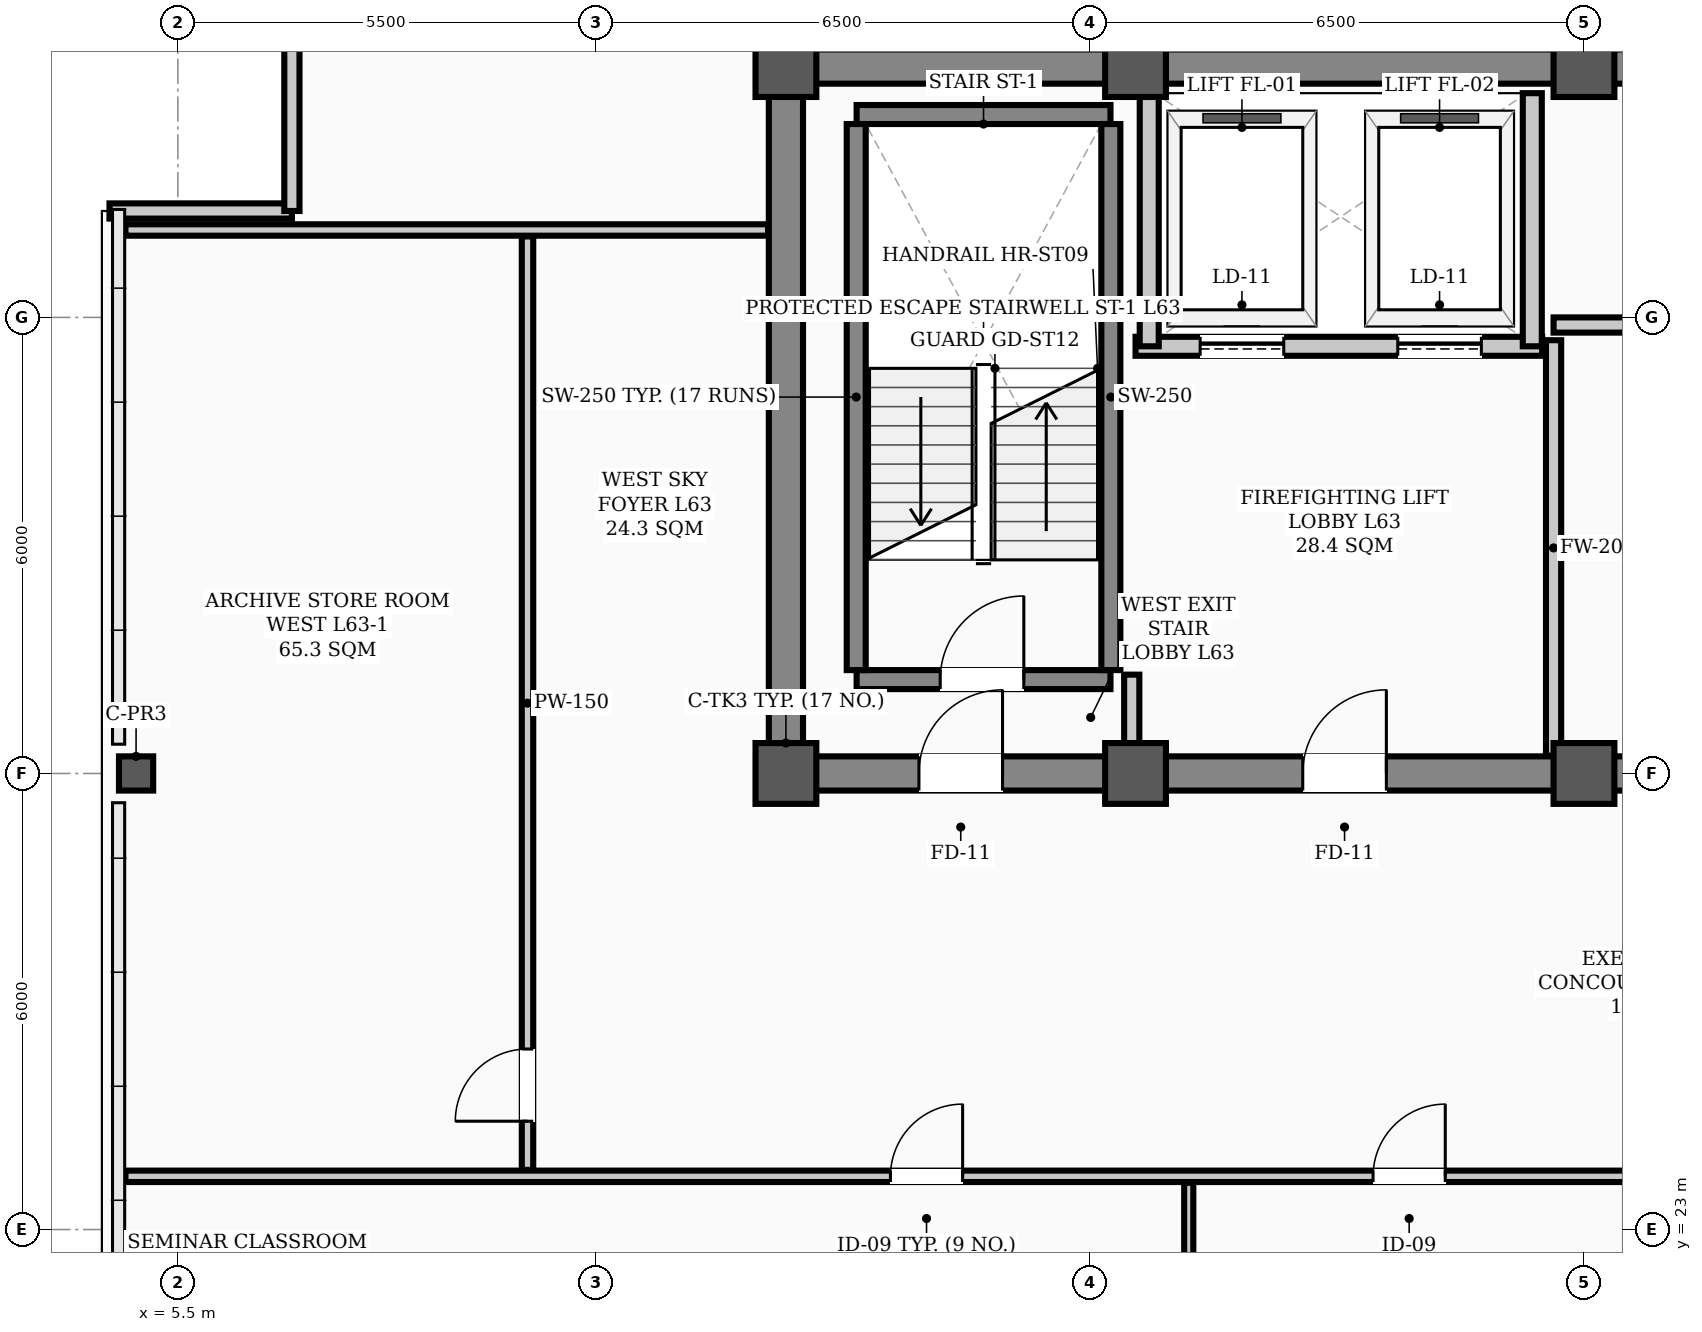
"""IFC4 building model, lengths in metres.
Left out: names, types, materials, properties, quantities, classifications, styles, units other than length and angle.
Written with IfcOpenShell. Run it as: python <this file> out.ifc"""

import sys

from ifc_helpers import new_model, si_unit, direction, frame, frame_2d, origin, origin_2d, place, context, subcontext, project, spatial, rectangle, hollow_rectangle, extrude, element, fill, save


model = new_model("IFC4")
c1 = context("Model", 3, precision=1e-05, world=origin(), true_north=direction((0.0, 1.0)))
c2 = subcontext(c1, "Body", "Model", "MODEL_VIEW")
j1 = project(units=[si_unit("LENGTHUNIT", "METRE"), si_unit("PLANEANGLEUNIT", "RADIAN")], contexts=[c1])
p1 = place(None, origin())
s1 = spatial("IfcSite", under=j1, at=p1, CompositionType="ELEMENT")
p2 = place(p1, origin())
s2 = spatial("IfcBuilding", under=s1, at=p2, CompositionType="ELEMENT")
p3 = place(p2, frame((0.0, 0.0, 254.0)))
s3 = spatial("IfcBuildingStorey", under=s2, at=p3, CompositionType="ELEMENT", Elevation=254.0)
for number, where, z_axis, x_axis in (
    (1, (13.5, 29.0, 0.0), (0.0, 0.0, 1.0), (1.0, 0.0, 0.0)),
    (2, (13.5, 38.3, 0.0), (0.0, 0.0, 1.0), (1.0, 0.0, 0.0)),
    (3, (18.1, 29.0, 0.0), (0.0, 0.0, 1.0), (1.0, 0.0, 0.0)),
    (4, (18.1, 38.3, 0.0), (0.0, 0.0, 1.0), (1.0, 0.0, 0.0)),
    (5, (24.0, 29.0, 0.0), (0.0, 0.0, 1.0), (1.0, 0.0, 0.0)),
    (6, (24.0, 38.3, 0.0), (0.0, 0.0, 1.0), (1.0, 0.0, 0.0)),
):
    element("IfcColumn", number, at=place(p3, frame(where, z_axis=z_axis, x_axis=x_axis)), inside=s3, PredefinedType="COLUMN", context=c2, shape_type="SweptSolid", body=[
        extrude(hollow_rectangle(XDim=0.8, YDim=0.8, WallThickness=0.032, InnerFilletRadius=0.016, OuterFilletRadius=0.048, at=origin_2d()), origin(), (0.0, 0.0, 1.0), 3.9),
    ])
p4 = place(p3, frame((4.95, 29.0, 0.0), z_axis=(0.0, 0.0, 1.0), x_axis=(1.0, 0.0, 0.0)))
e7 = element("IfcColumn", 7, at=p4, inside=s3, PredefinedType="COLUMN", context=c2, shape_type="SweptSolid", body=[
    extrude(hollow_rectangle(XDim=0.45, YDim=0.45, WallThickness=0.022, InnerFilletRadius=0.022, OuterFilletRadius=0.044, at=origin_2d()), origin(), (0.0, 0.0, 1.0), 3.9),
])
p5 = place(p3, frame((4.6, 36.4, 0.0), z_axis=(0.0, 0.0, 1.0), x_axis=(1.0, 0.0, 0.0)))
e8 = element("IfcWall", 8, at=p5, inside=s3, PredefinedType="PARAPET", context=c2, shape_type="SweptSolid", body=[
    extrude(rectangle(XDim=2.4, YDim=0.2, at=frame_2d((1.2, 0.0))), origin(), (0.0, 0.0, 1.0), 1.2),
])
p6 = place(p3, frame((7.0, 36.4, 0.0), z_axis=(0.0, 0.0, 1.0), x_axis=(0.0, 1.0, 0.0)))
e9 = element("IfcWall", 9, at=p6, inside=s3, PredefinedType="PARAPET", context=c2, shape_type="SweptSolid", body=[
    extrude(rectangle(XDim=2.4, YDim=0.2, at=frame_2d((1.2, 0.0))), origin(), (0.0, 0.0, 1.0), 1.2),
])
p7 = place(p3, frame((13.5, 29.0, 0.0), z_axis=(0.0, 0.0, 1.0), x_axis=(1.0, 0.0, 0.0)))
e10 = element("IfcWall", 10, at=p7, inside=s3, PredefinedType="SHEAR", context=c2, shape_type="SweptSolid", body=[
    extrude(rectangle(XDim=30.5, YDim=0.45, at=frame_2d((15.25, 0.0))), origin(), (0.0, 0.0, 1.0), 3.66),
])
p8 = place(p7, frame((1.75, 0.0, 0.0)))
e11 = element("IfcOpeningElement", 11, at=p8, cuts=e10, PredefinedType="OPENING", context=c2, shape_type="SweptSolid", body=[
    extrude(rectangle(XDim=1.1, YDim=2.08, at=frame_2d((0.55, 1.04))), frame((0.0, 0.235, 0.0), z_axis=(0.0, -1.0, 0.0), x_axis=(1.0, 0.0, 0.0)), (0.0, 0.0, 1.0), 0.47),
])
p9 = place(p7, frame((26.7, 0.0, 0.0)))
e12 = element("IfcOpeningElement", 12, at=p9, cuts=e10, PredefinedType="OPENING", context=c2, shape_type="SweptSolid", body=[
    extrude(rectangle(XDim=1.1, YDim=2.08, at=frame_2d((0.55, 1.04))), frame((0.0, 0.235, 0.0), z_axis=(0.0, -1.0, 0.0), x_axis=(1.0, 0.0, 0.0)), (0.0, 0.0, 1.0), 0.47),
])
p10 = place(p7, frame((6.8, 0.0, 0.0)))
e13 = element("IfcOpeningElement", 13, at=p10, cuts=e10, PredefinedType="OPENING", context=c2, shape_type="SweptSolid", body=[
    extrude(rectangle(XDim=1.1, YDim=2.08, at=frame_2d((0.55, 1.04))), frame((0.0, 0.235, 0.0), z_axis=(0.0, -1.0, 0.0), x_axis=(1.0, 0.0, 0.0)), (0.0, 0.0, 1.0), 0.47),
])
p11 = place(p7, frame((13.2, 0.0, 0.0)))
e14 = element("IfcOpeningElement", 14, at=p11, cuts=e10, PredefinedType="OPENING", context=c2, shape_type="SweptSolid", body=[
    extrude(rectangle(XDim=1.6, YDim=2.08, at=frame_2d((0.8, 1.04))), frame((0.0, 0.235, 0.0), z_axis=(0.0, -1.0, 0.0), x_axis=(1.0, 0.0, 0.0)), (0.0, 0.0, 1.0), 0.47),
])
p12 = place(p7, frame((19.6, 0.0, 0.0)))
e15 = element("IfcOpeningElement", 15, at=p12, cuts=e10, PredefinedType="OPENING", context=c2, shape_type="SweptSolid", body=[
    extrude(rectangle(XDim=0.9, YDim=2.08, at=frame_2d((0.45, 1.04))), frame((0.0, 0.235, 0.0), z_axis=(0.0, -1.0, 0.0), x_axis=(1.0, 0.0, 0.0)), (0.0, 0.0, 1.0), 0.47),
])
p13 = place(p7, frame((21.6, 0.0, 0.0)))
e16 = element("IfcOpeningElement", 16, at=p13, cuts=e10, PredefinedType="OPENING", context=c2, shape_type="SweptSolid", body=[
    extrude(rectangle(XDim=0.9, YDim=2.08, at=frame_2d((0.45, 1.04))), frame((0.0, 0.235, 0.0), z_axis=(0.0, -1.0, 0.0), x_axis=(1.0, 0.0, 0.0)), (0.0, 0.0, 1.0), 0.47),
])
p14 = place(p3, frame((13.5, 38.3, 0.0), z_axis=(0.0, 0.0, 1.0), x_axis=(1.0, 0.0, 0.0)))
e17 = element("IfcWall", 17, at=p14, inside=s3, PredefinedType="SHEAR", context=c2, shape_type="SweptSolid", body=[
    extrude(rectangle(XDim=30.5, YDim=0.45, at=frame_2d((15.25, 0.0))), origin(), (0.0, 0.0, 1.0), 3.66),
])
p15 = place(p3, frame((13.5, 29.35, 0.0), z_axis=(0.0, 0.0, 1.0), x_axis=(0.0, 1.0, 0.0)))
e18 = element("IfcWall", 18, at=p15, inside=s3, PredefinedType="SHEAR", context=c2, shape_type="SweptSolid", body=[
    extrude(rectangle(XDim=8.6, YDim=0.45, at=frame_2d((4.3, 0.0))), origin(), (0.0, 0.0, 1.0), 3.66),
])
p16 = place(p3, frame((14.43, 30.235, 0.0), z_axis=(0.0, 0.0, 1.0), x_axis=(1.0, 0.0, 0.0)))
e19 = element("IfcWall", 19, at=p16, inside=s3, PredefinedType="STANDARD", context=c2, shape_type="SweptSolid", body=[
    extrude(rectangle(XDim=3.34, YDim=0.25, at=frame_2d((1.67, 0.0))), origin(), (0.0, 0.0, 1.0), 3.66),
])
p17 = place(p16, frame((1.1, 0.0, 0.0)))
e20 = element("IfcOpeningElement", 20, at=p17, cuts=e19, PredefinedType="OPENING", context=c2, shape_type="SweptSolid", body=[
    extrude(rectangle(XDim=1.1, YDim=2.08, at=frame_2d((0.55, 1.04))), frame((0.0, 0.135, 0.0), z_axis=(0.0, -1.0, 0.0), x_axis=(1.0, 0.0, 0.0)), (0.0, 0.0, 1.0), 0.27),
])
p18 = place(p3, frame((14.43, 37.669, 0.0), z_axis=(0.0, 0.0, 1.0), x_axis=(1.0, 0.0, 0.0)))
e21 = element("IfcWall", 21, at=p18, inside=s3, PredefinedType="STANDARD", context=c2, shape_type="SweptSolid", body=[
    extrude(rectangle(XDim=3.34, YDim=0.25, at=frame_2d((1.67, 0.0))), origin(), (0.0, 0.0, 1.0), 3.66),
])
for number, where, z_axis, x_axis in (
    (22, (14.425, 30.36, 0.0), (0.0, 0.0, 1.0), (0.0, 1.0, 0.0)),
    (23, (17.775, 30.36, 0.0), (0.0, 0.0, 1.0), (0.0, 1.0, 0.0)),
):
    element("IfcWall", number, at=place(p3, frame(where, z_axis=z_axis, x_axis=x_axis)), inside=s3, PredefinedType="STANDARD", context=c2, shape_type="SweptSolid", body=[
        extrude(rectangle(XDim=7.184, YDim=0.25, at=frame_2d((3.592, 0.0))), origin(), (0.0, 0.0, 1.0), 3.66),
    ])
p19 = place(p3, frame((18.1, 34.62, 0.0), z_axis=(0.0, 0.0, 1.0), x_axis=(1.0, 0.0, 0.0)))
e24 = element("IfcWall", 24, at=p19, inside=s3, PredefinedType="STANDARD", context=c2, shape_type="SweptSolid", body=[
    extrude(rectangle(XDim=5.35, YDim=0.25, at=frame_2d((2.675, 0.0))), origin(), (0.0, 0.0, 1.0), 3.66),
])
p20 = place(p19, frame((0.85, 0.0, 0.0)))
e25 = element("IfcOpeningElement", 25, at=p20, cuts=e24, PredefinedType="OPENING", context=c2, shape_type="SweptSolid", body=[
    extrude(rectangle(XDim=1.1, YDim=2.08, at=frame_2d((0.55, 1.04))), frame((0.0, 0.135, 0.0), z_axis=(0.0, -1.0, 0.0), x_axis=(1.0, 0.0, 0.0)), (0.0, 0.0, 1.0), 0.27),
])
p21 = place(p19, frame((3.45, 0.0, 0.0)))
e26 = element("IfcOpeningElement", 26, at=p21, cuts=e24, PredefinedType="OPENING", context=c2, shape_type="SweptSolid", body=[
    extrude(rectangle(XDim=1.1, YDim=2.08, at=frame_2d((0.55, 1.04))), frame((0.0, 0.135, 0.0), z_axis=(0.0, -1.0, 0.0), x_axis=(1.0, 0.0, 0.0)), (0.0, 0.0, 1.0), 0.27),
])
for number, where, z_axis, x_axis in (
    (27, (18.28, 34.62, 0.0), (0.0, 0.0, 1.0), (0.0, 1.0, 0.0)),
    (28, (23.32, 34.62, 0.0), (0.0, 0.0, 1.0), (0.0, 1.0, 0.0)),
):
    element("IfcWall", number, at=place(p3, frame(where, z_axis=z_axis, x_axis=x_axis)), inside=s3, PredefinedType="STANDARD", context=c2, shape_type="SweptSolid", body=[
        extrude(rectangle(XDim=3.33, YDim=0.25, at=frame_2d((1.665, 0.0))), origin(), (0.0, 0.0, 1.0), 2.24),
    ])
p22 = place(p3, frame((23.6, 34.9, 0.0), z_axis=(0.0, 0.0, 1.0), x_axis=(1.0, 0.0, 0.0)))
e29 = element("IfcWall", 29, at=p22, inside=s3, PredefinedType="STANDARD", context=c2, shape_type="SweptSolid", body=[
    extrude(rectangle(XDim=8.18, YDim=0.2, at=frame_2d((4.09, 0.0))), origin(), (0.0, 0.0, 1.0), 3.66),
])
p23 = place(p22, frame((3.45, 0.0, 0.0)))
e30 = element("IfcOpeningElement", 30, at=p23, cuts=e29, PredefinedType="OPENING", context=c2, shape_type="SweptSolid", body=[
    extrude(rectangle(XDim=1.1, YDim=2.08, at=frame_2d((0.55, 1.04))), frame((0.0, 0.11, 0.0), z_axis=(0.0, -1.0, 0.0), x_axis=(1.0, 0.0, 0.0)), (0.0, 0.0, 1.0), 0.22),
])
p24 = place(p3, frame((4.81, 23.7, 0.0), z_axis=(0.0, 0.0, 1.0), x_axis=(1.0, 0.0, 0.0)))
e31 = element("IfcWall", 31, at=p24, inside=s3, PredefinedType="PARTITIONING", context=c2, shape_type="SweptSolid", body=[
    extrude(rectangle(XDim=40.88, YDim=0.15, at=frame_2d((20.44, 0.0))), origin(), (0.0, 0.0, 1.0), 2.24),
])
p25 = place(p24, frame((10.065, 0.0, 0.0)))
e32 = element("IfcOpeningElement", 32, at=p25, cuts=e31, PredefinedType="OPENING", context=c2, shape_type="SweptSolid", body=[
    extrude(rectangle(XDim=0.95, YDim=2.08, at=frame_2d((0.475, 1.04))), frame((0.0, 0.085, 0.0), z_axis=(0.0, -1.0, 0.0), x_axis=(1.0, 0.0, 0.0)), (0.0, 0.0, 1.0), 0.17),
])
p26 = place(p24, frame((16.415, 0.0, 0.0)))
e33 = element("IfcOpeningElement", 33, at=p26, cuts=e31, PredefinedType="OPENING", context=c2, shape_type="SweptSolid", body=[
    extrude(rectangle(XDim=0.95, YDim=2.08, at=frame_2d((0.475, 1.04))), frame((0.0, 0.085, 0.0), z_axis=(0.0, -1.0, 0.0), x_axis=(1.0, 0.0, 0.0)), (0.0, 0.0, 1.0), 0.17),
])
p27 = place(p24, frame((23.815, 0.0, 0.0)))
e34 = element("IfcOpeningElement", 34, at=p27, cuts=e31, PredefinedType="OPENING", context=c2, shape_type="SweptSolid", body=[
    extrude(rectangle(XDim=0.95, YDim=2.08, at=frame_2d((0.475, 1.04))), frame((0.0, 0.085, 0.0), z_axis=(0.0, -1.0, 0.0), x_axis=(1.0, 0.0, 0.0)), (0.0, 0.0, 1.0), 0.17),
])
p28 = place(p24, frame((35.26, 0.0, 0.0)))
e35 = element("IfcOpeningElement", 35, at=p28, cuts=e31, PredefinedType="OPENING", context=c2, shape_type="SweptSolid", body=[
    extrude(rectangle(XDim=0.95, YDim=2.08, at=frame_2d((0.475, 1.04))), frame((0.0, 0.085, 0.0), z_axis=(0.0, -1.0, 0.0), x_axis=(1.0, 0.0, 0.0)), (0.0, 0.0, 1.0), 0.17),
])
p29 = place(p3, frame((4.81, 36.15, 0.0), z_axis=(0.0, 0.0, 1.0), x_axis=(1.0, 0.0, 0.0)))
e36 = element("IfcWall", 36, at=p29, inside=s3, PredefinedType="PARTITIONING", context=c2, shape_type="SweptSolid", body=[
    extrude(rectangle(XDim=8.455, YDim=0.15, at=frame_2d((4.228, 0.0))), origin(), (0.0, 0.0, 1.0), 2.24),
])
p30 = place(p3, frame((18.05, 29.235, 0.0), z_axis=(0.0, 0.0, 1.0), x_axis=(0.0, 1.0, 0.0)))
e37 = element("IfcWall", 37, at=p30, inside=s3, PredefinedType="STANDARD", context=c2, shape_type="SweptSolid", body=[
    extrude(rectangle(XDim=1.065, YDim=0.2, at=frame_2d((0.532, 0.0))), origin(), (0.0, 0.0, 1.0), 2.24),
])
p31 = place(p3, frame((23.6, 29.235, 0.0), z_axis=(0.0, 0.0, 1.0), x_axis=(0.0, 1.0, 0.0)))
e38 = element("IfcWall", 38, at=p31, inside=s3, PredefinedType="STANDARD", context=c2, shape_type="SweptSolid", body=[
    extrude(rectangle(XDim=5.465, YDim=0.2, at=frame_2d((2.732, 0.0))), origin(), (0.0, 0.0, 1.0), 2.24),
])
p32 = place(p3, frame((10.1, 23.785, 0.0), z_axis=(0.0, 0.0, 1.0), x_axis=(0.0, 1.0, 0.0)))
e39 = element("IfcWall", 39, at=p32, inside=s3, PredefinedType="PARTITIONING", context=c2, shape_type="SweptSolid", body=[
    extrude(rectangle(XDim=12.28, YDim=0.15, at=frame_2d((6.14, 0.0))), origin(), (0.0, 0.0, 1.0), 2.24),
])
p33 = place(p32, frame((0.64, 0.0, 0.0)))
e40 = element("IfcOpeningElement", 40, at=p33, cuts=e39, PredefinedType="OPENING", context=c2, shape_type="SweptSolid", body=[
    extrude(rectangle(XDim=0.95, YDim=2.08, at=frame_2d((0.475, 1.04))), frame((0.0, 0.085, 0.0), z_axis=(0.0, -1.0, 0.0), x_axis=(1.0, 0.0, 0.0)), (0.0, 0.0, 1.0), 0.17),
])
p34 = place(p3, frame((18.8, 12.41, 0.0), z_axis=(0.0, 0.0, 1.0), x_axis=(0.0, 1.0, 0.0)))
e41 = element("IfcWall", 41, at=p34, inside=s3, PredefinedType="PARTITIONING", context=c2, shape_type="SweptSolid", body=[
    extrude(rectangle(XDim=11.205, YDim=0.12, at=frame_2d((5.603, 0.0))), origin(), (0.0, 0.0, 1.0), 2.24),
])
p35 = place(p17, origin())
e42 = element("IfcDoor", 42, at=p35, inside=s3, OperationType="SINGLE_SWING_RIGHT", PredefinedType="DOOR", context=c2, shape_type="SweptSolid", body=[
    extrude(rectangle(XDim=1.1, YDim=2.08, at=frame_2d((0.55, 1.04))), frame((0.0, 0.025, 0.0), z_axis=(0.0, -1.0, 0.0), x_axis=(1.0, 0.0, 0.0)), (0.0, 0.0, 1.0), 0.05),
])
fill(e20, e42)
p36 = place(p8, origin())
e43 = element("IfcDoor", 43, at=p36, inside=s3, OperationType="SINGLE_SWING_RIGHT", PredefinedType="DOOR", context=c2, shape_type="SweptSolid", body=[
    extrude(rectangle(XDim=1.1, YDim=2.08, at=frame_2d((0.55, 1.04))), frame((0.0, 0.025, 0.0), z_axis=(0.0, -1.0, 0.0), x_axis=(1.0, 0.0, 0.0)), (0.0, 0.0, 1.0), 0.05),
])
fill(e11, e43)
p37 = place(p10, origin())
e44 = element("IfcDoor", 44, at=p37, inside=s3, OperationType="SINGLE_SWING_RIGHT", PredefinedType="DOOR", context=c2, shape_type="SweptSolid", body=[
    extrude(rectangle(XDim=1.1, YDim=2.08, at=frame_2d((0.55, 1.04))), frame((0.0, 0.025, 0.0), z_axis=(0.0, -1.0, 0.0), x_axis=(1.0, 0.0, 0.0)), (0.0, 0.0, 1.0), 0.05),
])
fill(e13, e44)
p38 = place(p25, origin())
e45 = element("IfcDoor", 45, at=p38, inside=s3, OperationType="SINGLE_SWING_RIGHT", PredefinedType="DOOR", context=c2, shape_type="SweptSolid", body=[
    extrude(rectangle(XDim=0.95, YDim=2.08, at=frame_2d((0.475, 1.04))), frame((0.0, 0.025, 0.0), z_axis=(0.0, -1.0, 0.0), x_axis=(1.0, 0.0, 0.0)), (0.0, 0.0, 1.0), 0.05),
])
fill(e32, e45)
p39 = place(p26, origin())
e46 = element("IfcDoor", 46, at=p39, inside=s3, OperationType="SINGLE_SWING_RIGHT", PredefinedType="DOOR", context=c2, shape_type="SweptSolid", body=[
    extrude(rectangle(XDim=0.95, YDim=2.08, at=frame_2d((0.475, 1.04))), frame((0.0, 0.025, 0.0), z_axis=(0.0, -1.0, 0.0), x_axis=(1.0, 0.0, 0.0)), (0.0, 0.0, 1.0), 0.05),
])
fill(e33, e46)
p40 = place(p33, origin())
e47 = element("IfcDoor", 47, at=p40, inside=s3, OperationType="SINGLE_SWING_LEFT", PredefinedType="DOOR", context=c2, shape_type="SweptSolid", body=[
    extrude(rectangle(XDim=0.95, YDim=2.08, at=frame_2d((0.475, 1.04))), frame((0.0, 0.025, 0.0), z_axis=(0.0, -1.0, 0.0), x_axis=(1.0, 0.0, 0.0)), (0.0, 0.0, 1.0), 0.05),
])
fill(e40, e47)
p41 = place(p20, origin())
e48 = element("IfcDoor", 48, at=p41, inside=s3, OperationType="SLIDING_TO_LEFT", PredefinedType="DOOR", context=c2, shape_type="SweptSolid", body=[
    extrude(rectangle(XDim=1.1, YDim=2.08, at=frame_2d((0.55, 1.04))), frame((0.0, 0.025, 0.0), z_axis=(0.0, -1.0, 0.0), x_axis=(1.0, 0.0, 0.0)), (0.0, 0.0, 1.0), 0.05),
])
fill(e25, e48)
p42 = place(p21, origin())
e49 = element("IfcDoor", 49, at=p42, inside=s3, OperationType="SLIDING_TO_LEFT", PredefinedType="DOOR", context=c2, shape_type="SweptSolid", body=[
    extrude(rectangle(XDim=1.1, YDim=2.08, at=frame_2d((0.55, 1.04))), frame((0.0, 0.025, 0.0), z_axis=(0.0, -1.0, 0.0), x_axis=(1.0, 0.0, 0.0)), (0.0, 0.0, 1.0), 0.05),
])
fill(e26, e49)
save(model, sys.argv[1])
